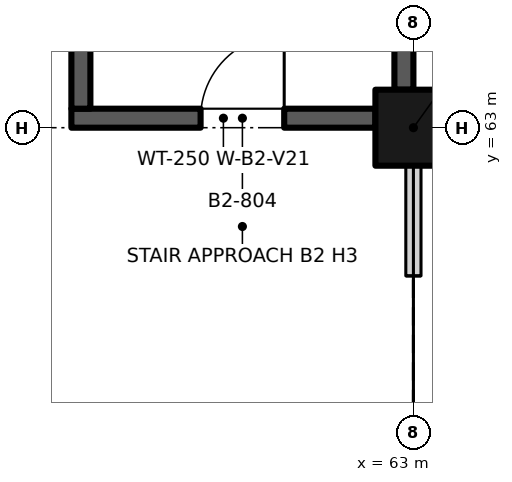
"""IFC4 building model, lengths in metres.
Left out: names, types, materials, properties, quantities, classifications, styles, units other than length and angle.
Written with IfcOpenShell. Run it as: python <this file> out.ifc"""

import sys

from ifc_helpers import new_model, si_unit, direction, frame, frame_2d, origin, origin_2d, place, context, subcontext, project, spatial, rectangle, extrude, element, fill, save


model = new_model("IFC4")
c1 = context("Model", 3, precision=1e-05, world=origin(), true_north=direction((0.0, 1.0)))
c2 = subcontext(c1, "Body", "Model", "MODEL_VIEW")
j1 = project(units=[si_unit("LENGTHUNIT", "METRE"), si_unit("PLANEANGLEUNIT", "RADIAN")], contexts=[c1])
p1 = place(None, origin())
s1 = spatial("IfcSite", under=j1, at=p1, CompositionType="ELEMENT")
p2 = place(p1, origin())
s2 = spatial("IfcBuilding", under=s1, at=p2, CompositionType="ELEMENT")
p3 = place(p2, frame((0.0, 0.0, -9.9)))
s3 = spatial("IfcBuildingStorey", under=s2, at=p3, CompositionType="ELEMENT", Elevation=-9.9)
p4 = place(p3, frame((63.0, 63.0, 0.0), z_axis=(0.0, 0.0, 1.0), x_axis=(1.0, 0.0, 0.0)))
e1 = element("IfcColumn", 1, at=p4, inside=s3, PredefinedType="COLUMN", context=c2, shape_type="SweptSolid", body=[
    extrude(rectangle(XDim=1.0, YDim=1.0, at=origin_2d()), origin(), (0.0, 0.0, 1.0), 4.8),
])
p5 = place(p3, frame((58.5, 63.125, 0.0), z_axis=(0.0, 0.0, 1.0), x_axis=(1.0, 0.0, 0.0)))
e2 = element("IfcWall", 2, at=p5, inside=s3, PredefinedType="SHEAR", context=c2, shape_type="SweptSolid", body=[
    extrude(rectangle(XDim=4.0, YDim=0.25, at=frame_2d((2.0, 0.0))), origin(), (0.0, 0.0, 1.0), 4.8),
])
p6 = place(p5, frame((1.7, 0.0, 0.0)))
e3 = element("IfcOpeningElement", 3, at=p6, cuts=e2, PredefinedType="OPENING", context=c2, shape_type="SweptSolid", body=[
    extrude(rectangle(XDim=1.1, YDim=2.1, at=frame_2d((0.55, 1.05))), frame((0.0, 0.135, 0.0), z_axis=(0.0, -1.0, 0.0), x_axis=(1.0, 0.0, 0.0)), (0.0, 0.0, 1.0), 0.27),
])
p7 = place(p3, frame((58.625, 63.25, 0.0), z_axis=(0.0, 0.0, 1.0), x_axis=(0.0, 1.0, 0.0)))
e4 = element("IfcWall", 4, at=p7, inside=s3, PredefinedType="SHEAR", context=c2, shape_type="SweptSolid", body=[
    extrude(rectangle(XDim=8.5, YDim=0.25, at=frame_2d((4.25, 0.0))), origin(), (0.0, 0.0, 1.0), 4.8),
])
p8 = place(p3, frame((62.875, 63.5, 0.0), z_axis=(0.0, 0.0, 1.0), x_axis=(0.0, 1.0, 0.0)))
e5 = element("IfcWall", 5, at=p8, inside=s3, PredefinedType="SHEAR", context=c2, shape_type="SweptSolid", body=[
    extrude(rectangle(XDim=8.0, YDim=0.25, at=frame_2d((4.0, 0.0))), origin(), (0.0, 0.0, 1.0), 4.8),
])
p9 = place(p3, frame((63.0, 54.5, 0.0), z_axis=(0.0, 0.0, 1.0), x_axis=(0.0, 1.0, 0.0)))
e6 = element("IfcWall", 6, at=p9, inside=s3, PredefinedType="PARTITIONING", context=c2, shape_type="SweptSolid", body=[
    extrude(rectangle(XDim=8.0, YDim=0.2, at=frame_2d((4.0, 0.0))), origin(), (0.0, 0.0, 1.0), 4.0),
])
p10 = place(p9, frame((1.55, 0.0, 0.0)))
e7 = element("IfcOpeningElement", 7, at=p10, cuts=e6, PredefinedType="OPENING", context=c2, shape_type="SweptSolid", body=[
    extrude(rectangle(XDim=5.0, YDim=2.4, at=frame_2d((2.5, 1.2))), frame((0.0, 0.11, 0.0), z_axis=(0.0, -1.0, 0.0), x_axis=(1.0, 0.0, 0.0)), (0.0, 0.0, 1.0), 0.22),
])
p11 = place(p6, origin())
e8 = element("IfcDoor", 8, at=p11, inside=s3, OperationType="SINGLE_SWING_RIGHT", PredefinedType="DOOR", context=c2, shape_type="SweptSolid", body=[
    extrude(rectangle(XDim=1.1, YDim=2.1, at=frame_2d((0.55, 1.05))), frame((0.0, 0.025, 0.0), z_axis=(0.0, -1.0, 0.0), x_axis=(1.0, 0.0, 0.0)), (0.0, 0.0, 1.0), 0.05),
])
fill(e3, e8)
p12 = place(p10, origin())
e9 = element("IfcDoor", 9, at=p12, inside=s3, OperationType="SINGLE_SWING_LEFT", PredefinedType="DOOR", context=c2, shape_type="SweptSolid", body=[
    extrude(rectangle(XDim=5.0, YDim=2.4, at=frame_2d((2.5, 1.2))), frame((0.0, 0.025, 0.0), z_axis=(0.0, -1.0, 0.0), x_axis=(1.0, 0.0, 0.0)), (0.0, 0.0, 1.0), 0.05),
])
fill(e7, e9)
save(model, sys.argv[1])
